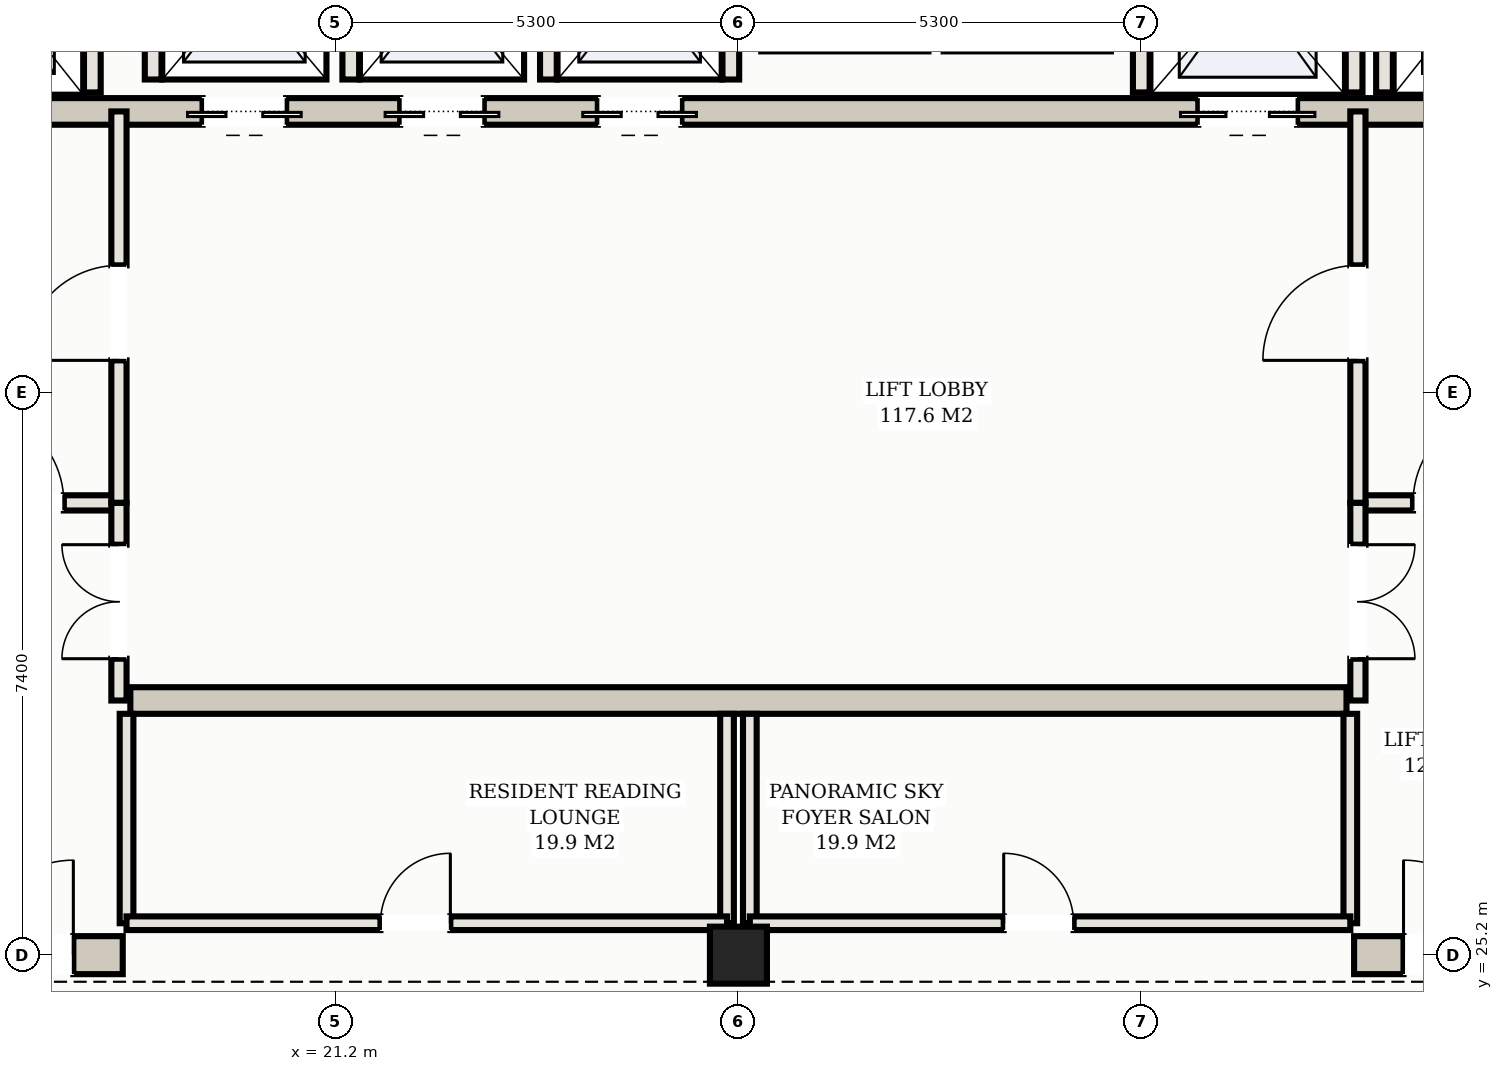
"""IFC4 building model, lengths in metres.
Left out: names, types, materials, properties, quantities, classifications, styles, units other than length and angle.
Written with IfcOpenShell. Run it as: python <this file> out.ifc"""

import sys

from ifc_helpers import new_model, si_unit, direction, frame, frame_2d, origin, origin_2d, place, context, subcontext, project, spatial, rectangle, hollow_rectangle, extrude, element, fill, save


model = new_model("IFC4")
c1 = context("Model", 3, precision=1e-05, world=origin(), true_north=direction((0.0, 1.0)))
c2 = subcontext(c1, "Body", "Model", "MODEL_VIEW")
j1 = project(units=[si_unit("LENGTHUNIT", "METRE"), si_unit("PLANEANGLEUNIT", "RADIAN")], contexts=[c1])
p1 = place(None, origin())
s1 = spatial("IfcSite", under=j1, at=p1, CompositionType="ELEMENT")
p2 = place(p1, origin())
s2 = spatial("IfcBuilding", under=s1, at=p2, CompositionType="ELEMENT")
p3 = place(p2, frame((0.0, 0.0, 226.4)))
s3 = spatial("IfcBuildingStorey", under=s2, at=p3, CompositionType="ELEMENT", Elevation=226.4)
p4 = place(p3, frame((10.35, 25.2, 0.0), z_axis=(0.0, 0.0, 1.0), x_axis=(1.0, 0.0, 0.0)))
e1 = element("IfcWall", 1, at=p4, inside=s3, PredefinedType="SHEAR", context=c2, shape_type="SweptSolid", body=[
    extrude(rectangle(XDim=8.05, YDim=0.5, at=frame_2d((4.025, 0.0))), origin(), (0.0, 0.0, 1.0), 3.11),
])
p5 = place(p4, frame((6.15, 0.0, 0.0)))
e2 = element("IfcOpeningElement", 2, at=p5, cuts=e1, PredefinedType="OPENING", context=c2, shape_type="SweptSolid", body=[
    extrude(rectangle(XDim=1.25, YDim=2.2, at=frame_2d((0.625, 1.1))), frame((0.0, 0.26, 0.0), z_axis=(0.0, -1.0, 0.0), x_axis=(1.0, 0.0, 0.0)), (0.0, 0.0, 1.0), 0.52),
])
p6 = place(p3, frame((34.6, 25.2, 0.0), z_axis=(0.0, 0.0, 1.0), x_axis=(1.0, 0.0, 0.0)))
e3 = element("IfcWall", 3, at=p6, inside=s3, PredefinedType="SHEAR", context=c2, shape_type="SweptSolid", body=[
    extrude(rectangle(XDim=8.05, YDim=0.5, at=frame_2d((4.025, 0.0))), origin(), (0.0, 0.0, 1.0), 3.11),
])
p7 = place(p6, frame((0.65, 0.0, 0.0)))
e4 = element("IfcOpeningElement", 4, at=p7, cuts=e3, PredefinedType="OPENING", context=c2, shape_type="SweptSolid", body=[
    extrude(rectangle(XDim=1.25, YDim=2.2, at=frame_2d((0.625, 1.1))), frame((0.0, 0.26, 0.0), z_axis=(0.0, -1.0, 0.0), x_axis=(1.0, 0.0, 0.0)), (0.0, 0.0, 1.0), 0.52),
])
p8 = place(p3, frame((15.5, 36.3, 0.0), z_axis=(0.0, 0.0, 1.0), x_axis=(1.0, 0.0, 0.0)))
e5 = element("IfcWall", 5, at=p8, inside=s3, PredefinedType="SHEAR", context=c2, shape_type="SweptSolid", body=[
    extrude(rectangle(XDim=22.0, YDim=0.35, at=frame_2d((11.0, 0.0))), origin(), (0.0, 0.0, 1.0), 3.11),
])
p9 = place(p8, frame((0.65, 0.0, 0.0)))
e6 = element("IfcOpeningElement", 6, at=p9, cuts=e5, PredefinedType="OPENING", context=c2, shape_type="SweptSolid", body=[
    extrude(rectangle(XDim=1.1, YDim=2.15, at=frame_2d((0.55, 1.075))), frame((0.0, 0.185, 0.0), z_axis=(0.0, -1.0, 0.0), x_axis=(1.0, 0.0, 0.0)), (0.0, 0.0, 1.0), 0.37),
])
p10 = place(p8, frame((20.25, 0.0, 0.0)))
e7 = element("IfcOpeningElement", 7, at=p10, cuts=e5, PredefinedType="OPENING", context=c2, shape_type="SweptSolid", body=[
    extrude(rectangle(XDim=1.1, YDim=2.15, at=frame_2d((0.55, 1.075))), frame((0.0, 0.185, 0.0), z_axis=(0.0, -1.0, 0.0), x_axis=(1.0, 0.0, 0.0)), (0.0, 0.0, 1.0), 0.37),
])
p11 = place(p8, frame((17.05, 0.0, 0.0)))
e8 = element("IfcOpeningElement", 8, at=p11, cuts=e5, PredefinedType="OPENING", context=c2, shape_type="SweptSolid", body=[
    extrude(rectangle(XDim=1.3, YDim=2.2, at=frame_2d((0.65, 1.1))), frame((0.0, 0.185, 0.0), z_axis=(0.0, -1.0, 0.0), x_axis=(1.0, 0.0, 0.0)), (0.0, 0.0, 1.0), 0.37),
])
p12 = place(p8, frame((3.95, 0.0, 0.0)))
e9 = element("IfcOpeningElement", 9, at=p12, cuts=e5, PredefinedType="OPENING", context=c2, shape_type="SweptSolid", body=[
    extrude(rectangle(XDim=1.1, YDim=2.15, at=frame_2d((0.55, 1.075))), frame((0.0, 0.185, 0.0), z_axis=(0.0, -1.0, 0.0), x_axis=(1.0, 0.0, 0.0)), (0.0, 0.0, 1.0), 0.37),
])
p13 = place(p8, frame((6.55, 0.0, 0.0)))
e10 = element("IfcOpeningElement", 10, at=p13, cuts=e5, PredefinedType="OPENING", context=c2, shape_type="SweptSolid", body=[
    extrude(rectangle(XDim=1.1, YDim=2.15, at=frame_2d((0.55, 1.075))), frame((0.0, 0.185, 0.0), z_axis=(0.0, -1.0, 0.0), x_axis=(1.0, 0.0, 0.0)), (0.0, 0.0, 1.0), 0.37),
])
p14 = place(p8, frame((9.15, 0.0, 0.0)))
e11 = element("IfcOpeningElement", 11, at=p14, cuts=e5, PredefinedType="OPENING", context=c2, shape_type="SweptSolid", body=[
    extrude(rectangle(XDim=1.1, YDim=2.15, at=frame_2d((0.55, 1.075))), frame((0.0, 0.185, 0.0), z_axis=(0.0, -1.0, 0.0), x_axis=(1.0, 0.0, 0.0)), (0.0, 0.0, 1.0), 0.37),
])
p15 = place(p3, frame((18.5, 28.55, 0.0), z_axis=(0.0, 0.0, 1.0), x_axis=(1.0, 0.0, 0.0)))
e12 = element("IfcWall", 12, at=p15, inside=s3, PredefinedType="SHEAR", context=c2, shape_type="SweptSolid", body=[
    extrude(rectangle(XDim=16.0, YDim=0.35, at=frame_2d((8.0, 0.0))), origin(), (0.0, 0.0, 1.0), 3.11),
])
p16 = place(p3, frame((26.5, 25.2, 0.0), z_axis=(0.0, 0.0, 1.0), x_axis=(1.0, 0.0, 0.0)))
e13 = element("IfcColumn", 13, at=p16, inside=s3, PredefinedType="COLUMN", context=c2, shape_type="SweptSolid", body=[
    extrude(hollow_rectangle(XDim=0.75, YDim=0.75, WallThickness=0.025, at=origin_2d()), origin(), (0.0, 0.0, 1.0), 3.3),
])
for number, where, z_axis, x_axis in (
    (14, (18.0, 36.55, 0.0), (0.0, 0.0, 1.0), (0.0, 1.0, 0.0)),
    (15, (35.0, 36.55, 0.0), (0.0, 0.0, 1.0), (0.0, 1.0, 0.0)),
    (16, (31.8, 36.55, 0.0), (0.0, 0.0, 1.0), (0.0, 1.0, 0.0)),
    (17, (34.6, 36.55, 0.0), (0.0, 0.0, 1.0), (0.0, 1.0, 0.0)),
):
    element("IfcWall", number, at=place(p3, frame(where, z_axis=z_axis, x_axis=x_axis)), inside=s3, PredefinedType="SOLIDWALL", context=c2, shape_type="SweptSolid", body=[
        extrude(rectangle(XDim=2.93, YDim=0.22, at=frame_2d((1.465, 0.0))), origin(), (0.0, 0.0, 1.0), 3.11),
    ])
for number, where, z_axis, x_axis in (
    (18, (18.8, 36.72, 0.0), (0.0, 0.0, 1.0), (0.0, 1.0, 0.0)),
    (19, (21.4, 36.72, 0.0), (0.0, 0.0, 1.0), (0.0, 1.0, 0.0)),
    (20, (24.0, 36.72, 0.0), (0.0, 0.0, 1.0), (0.0, 1.0, 0.0)),
    (21, (26.4, 36.72, 0.0), (0.0, 0.0, 1.0), (0.0, 1.0, 0.0)),
):
    element("IfcWall", number, at=place(p3, frame(where, z_axis=z_axis, x_axis=x_axis)), inside=s3, PredefinedType="SOLIDWALL", context=c2, shape_type="SweptSolid", body=[
        extrude(rectangle(XDim=2.56, YDim=0.22, at=frame_2d((1.28, 0.0))), origin(), (0.0, 0.0, 1.0), 3.11),
    ])
p17 = place(p3, frame((15.1, 31.15, 0.0), z_axis=(0.0, 0.0, 1.0), x_axis=(1.0, 0.0, 0.0)))
e22 = element("IfcWall", 22, at=p17, inside=s3, PredefinedType="PARTITIONING", context=c2, shape_type="SweptSolid", body=[
    extrude(rectangle(XDim=3.25, YDim=0.2, at=frame_2d((1.625, 0.0))), origin(), (0.0, 0.0, 1.0), 2.43),
])
p18 = place(p17, frame((1.275, 0.0, 0.0)))
e23 = element("IfcOpeningElement", 23, at=p18, cuts=e22, PredefinedType="OPENING", context=c2, shape_type="SweptSolid", body=[
    extrude(rectangle(XDim=1.25, YDim=2.2, at=frame_2d((0.625, 1.1))), frame((0.0, 0.11, 0.0), z_axis=(0.0, -1.0, 0.0), x_axis=(1.0, 0.0, 0.0)), (0.0, 0.0, 1.0), 0.22),
])
p19 = place(p3, frame((18.35, 31.15, 0.0), z_axis=(0.0, 0.0, 1.0), x_axis=(0.0, 1.0, 0.0)))
e24 = element("IfcWall", 24, at=p19, inside=s3, PredefinedType="PARTITIONING", context=c2, shape_type="SweptSolid", body=[
    extrude(rectangle(XDim=5.15, YDim=0.2, at=frame_2d((2.575, 0.0))), origin(), (0.0, 0.0, 1.0), 2.43),
])
p20 = place(p19, frame((1.875, 0.0, 0.0)))
e25 = element("IfcOpeningElement", 25, at=p20, cuts=e24, PredefinedType="OPENING", context=c2, shape_type="SweptSolid", body=[
    extrude(rectangle(XDim=1.25, YDim=2.2, at=frame_2d((0.625, 1.1))), frame((0.0, 0.11, 0.0), z_axis=(0.0, -1.0, 0.0), x_axis=(1.0, 0.0, 0.0)), (0.0, 0.0, 1.0), 0.22),
])
p21 = place(p3, frame((34.65, 31.15, 0.0), z_axis=(0.0, 0.0, 1.0), x_axis=(1.0, 0.0, 0.0)))
e26 = element("IfcWall", 26, at=p21, inside=s3, PredefinedType="PARTITIONING", context=c2, shape_type="SweptSolid", body=[
    extrude(rectangle(XDim=3.25, YDim=0.2, at=frame_2d((1.625, 0.0))), origin(), (0.0, 0.0, 1.0), 2.43),
])
p22 = place(p21, frame((0.725, 0.0, 0.0)))
e27 = element("IfcOpeningElement", 27, at=p22, cuts=e26, PredefinedType="OPENING", context=c2, shape_type="SweptSolid", body=[
    extrude(rectangle(XDim=1.25, YDim=2.2, at=frame_2d((0.625, 1.1))), frame((0.0, 0.11, 0.0), z_axis=(0.0, -1.0, 0.0), x_axis=(1.0, 0.0, 0.0)), (0.0, 0.0, 1.0), 0.22),
])
p23 = place(p3, frame((34.65, 31.15, 0.0), z_axis=(0.0, 0.0, 1.0), x_axis=(0.0, 1.0, 0.0)))
e28 = element("IfcWall", 28, at=p23, inside=s3, PredefinedType="PARTITIONING", context=c2, shape_type="SweptSolid", body=[
    extrude(rectangle(XDim=5.15, YDim=0.2, at=frame_2d((2.575, 0.0))), origin(), (0.0, 0.0, 1.0), 2.43),
])
p24 = place(p23, frame((1.875, 0.0, 0.0)))
e29 = element("IfcOpeningElement", 29, at=p24, cuts=e28, PredefinedType="OPENING", context=c2, shape_type="SweptSolid", body=[
    extrude(rectangle(XDim=1.25, YDim=2.2, at=frame_2d((0.625, 1.1))), frame((0.0, 0.11, 0.0), z_axis=(0.0, -1.0, 0.0), x_axis=(1.0, 0.0, 0.0)), (0.0, 0.0, 1.0), 0.22),
])
p25 = place(p3, frame((18.35, 28.55, 0.0), z_axis=(0.0, 0.0, 1.0), x_axis=(0.0, 1.0, 0.0)))
e30 = element("IfcWall", 30, at=p25, inside=s3, PredefinedType="PARTITIONING", context=c2, shape_type="SweptSolid", body=[
    extrude(rectangle(XDim=2.6, YDim=0.2, at=frame_2d((1.3, 0.0))), origin(), (0.0, 0.0, 1.0), 2.43),
])
p26 = place(p25, frame((0.55, 0.0, 0.0)))
e31 = element("IfcOpeningElement", 31, at=p26, cuts=e30, PredefinedType="OPENING", context=c2, shape_type="SweptSolid", body=[
    extrude(rectangle(XDim=1.5, YDim=2.25, at=frame_2d((0.75, 1.125))), frame((0.0, 0.11, 0.0), z_axis=(0.0, -1.0, 0.0), x_axis=(1.0, 0.0, 0.0)), (0.0, 0.0, 1.0), 0.22),
])
p27 = place(p3, frame((34.65, 28.55, 0.0), z_axis=(0.0, 0.0, 1.0), x_axis=(0.0, 1.0, 0.0)))
e32 = element("IfcWall", 32, at=p27, inside=s3, PredefinedType="PARTITIONING", context=c2, shape_type="SweptSolid", body=[
    extrude(rectangle(XDim=2.6, YDim=0.2, at=frame_2d((1.3, 0.0))), origin(), (0.0, 0.0, 1.0), 2.43),
])
p28 = place(p27, frame((0.55, 0.0, 0.0)))
e33 = element("IfcOpeningElement", 33, at=p28, cuts=e32, PredefinedType="OPENING", context=c2, shape_type="SweptSolid", body=[
    extrude(rectangle(XDim=1.5, YDim=2.25, at=frame_2d((0.75, 1.125))), frame((0.0, 0.11, 0.0), z_axis=(0.0, -1.0, 0.0), x_axis=(1.0, 0.0, 0.0)), (0.0, 0.0, 1.0), 0.22),
])
for number, where, z_axis, x_axis in (
    (34, (18.45, 25.62, 0.0), (0.0, 0.0, 1.0), (0.0, 1.0, 0.0)),
    (35, (26.35, 25.62, 0.0), (0.0, 0.0, 1.0), (0.0, 1.0, 0.0)),
):
    element("IfcWall", number, at=place(p3, frame(where, z_axis=z_axis, x_axis=x_axis)), inside=s3, PredefinedType="PARTITIONING", context=c2, shape_type="SweptSolid", body=[
        extrude(rectangle(XDim=2.755, YDim=0.18, at=frame_2d((1.377, 0.0))), origin(), (0.0, 0.0, 1.0), 2.43),
    ])
p29 = place(p3, frame((18.45, 25.62, 0.0), z_axis=(0.0, 0.0, 1.0), x_axis=(1.0, 0.0, 0.0)))
e36 = element("IfcWall", 36, at=p29, inside=s3, PredefinedType="PARTITIONING", context=c2, shape_type="SweptSolid", body=[
    extrude(rectangle(XDim=7.9, YDim=0.18, at=frame_2d((3.95, 0.0))), origin(), (0.0, 0.0, 1.0), 2.43),
])
p30 = place(p29, frame((3.34, 0.0, 0.0)))
e37 = element("IfcOpeningElement", 37, at=p30, cuts=e36, PredefinedType="OPENING", context=c2, shape_type="SweptSolid", body=[
    extrude(rectangle(XDim=0.92, YDim=2.15, at=frame_2d((0.46, 1.075))), frame((0.0, 0.1, 0.0), z_axis=(0.0, -1.0, 0.0), x_axis=(1.0, 0.0, 0.0)), (0.0, 0.0, 1.0), 0.2),
])
for number, where, z_axis, x_axis in (
    (38, (26.65, 25.62, 0.0), (0.0, 0.0, 1.0), (0.0, 1.0, 0.0)),
    (39, (34.55, 25.62, 0.0), (0.0, 0.0, 1.0), (0.0, 1.0, 0.0)),
):
    element("IfcWall", number, at=place(p3, frame(where, z_axis=z_axis, x_axis=x_axis)), inside=s3, PredefinedType="PARTITIONING", context=c2, shape_type="SweptSolid", body=[
        extrude(rectangle(XDim=2.755, YDim=0.18, at=frame_2d((1.377, 0.0))), origin(), (0.0, 0.0, 1.0), 2.43),
    ])
p31 = place(p3, frame((26.65, 25.62, 0.0), z_axis=(0.0, 0.0, 1.0), x_axis=(1.0, 0.0, 0.0)))
e40 = element("IfcWall", 40, at=p31, inside=s3, PredefinedType="PARTITIONING", context=c2, shape_type="SweptSolid", body=[
    extrude(rectangle(XDim=7.9, YDim=0.18, at=frame_2d((3.95, 0.0))), origin(), (0.0, 0.0, 1.0), 2.43),
])
p32 = place(p31, frame((3.34, 0.0, 0.0)))
e41 = element("IfcOpeningElement", 41, at=p32, cuts=e40, PredefinedType="OPENING", context=c2, shape_type="SweptSolid", body=[
    extrude(rectangle(XDim=0.92, YDim=2.15, at=frame_2d((0.46, 1.075))), frame((0.0, 0.1, 0.0), z_axis=(0.0, -1.0, 0.0), x_axis=(1.0, 0.0, 0.0)), (0.0, 0.0, 1.0), 0.2),
])
p33 = place(p11, frame((1.3, 0.0, 0.0), z_axis=(0.0, 0.0, 1.0), x_axis=(-1.0, 0.0, 0.0)))
e42 = element("IfcDoor", 42, at=p33, inside=s3, OperationType="DOUBLE_DOOR_SLIDING", PredefinedType="DOOR", context=c2, shape_type="SweptSolid", body=[
    extrude(rectangle(XDim=1.3, YDim=2.2, at=frame_2d((0.65, 1.1))), frame((0.0, 0.025, 0.0), z_axis=(0.0, -1.0, 0.0), x_axis=(1.0, 0.0, 0.0)), (0.0, 0.0, 1.0), 0.05),
])
fill(e8, e42)
p34 = place(p12, frame((1.1, 0.0, 0.0), z_axis=(0.0, 0.0, 1.0), x_axis=(-1.0, 0.0, 0.0)))
e43 = element("IfcDoor", 43, at=p34, inside=s3, OperationType="DOUBLE_DOOR_SLIDING", PredefinedType="DOOR", context=c2, shape_type="SweptSolid", body=[
    extrude(rectangle(XDim=1.1, YDim=2.15, at=frame_2d((0.55, 1.075))), frame((0.0, 0.025, 0.0), z_axis=(0.0, -1.0, 0.0), x_axis=(1.0, 0.0, 0.0)), (0.0, 0.0, 1.0), 0.05),
])
fill(e9, e43)
p35 = place(p13, frame((1.1, 0.0, 0.0), z_axis=(0.0, 0.0, 1.0), x_axis=(-1.0, 0.0, 0.0)))
e44 = element("IfcDoor", 44, at=p35, inside=s3, OperationType="DOUBLE_DOOR_SLIDING", PredefinedType="DOOR", context=c2, shape_type="SweptSolid", body=[
    extrude(rectangle(XDim=1.1, YDim=2.15, at=frame_2d((0.55, 1.075))), frame((0.0, 0.025, 0.0), z_axis=(0.0, -1.0, 0.0), x_axis=(1.0, 0.0, 0.0)), (0.0, 0.0, 1.0), 0.05),
])
fill(e10, e44)
p36 = place(p14, frame((1.1, 0.0, 0.0), z_axis=(0.0, 0.0, 1.0), x_axis=(-1.0, 0.0, 0.0)))
e45 = element("IfcDoor", 45, at=p36, inside=s3, OperationType="DOUBLE_DOOR_SLIDING", PredefinedType="DOOR", context=c2, shape_type="SweptSolid", body=[
    extrude(rectangle(XDim=1.1, YDim=2.15, at=frame_2d((0.55, 1.075))), frame((0.0, 0.025, 0.0), z_axis=(0.0, -1.0, 0.0), x_axis=(1.0, 0.0, 0.0)), (0.0, 0.0, 1.0), 0.05),
])
fill(e11, e45)
p37 = place(p5, origin())
e46 = element("IfcDoor", 46, at=p37, inside=s3, OperationType="SINGLE_SWING_RIGHT", PredefinedType="DOOR", context=c2, shape_type="SweptSolid", body=[
    extrude(rectangle(XDim=1.25, YDim=2.2, at=frame_2d((0.625, 1.1))), frame((0.0, 0.025, 0.0), z_axis=(0.0, -1.0, 0.0), x_axis=(1.0, 0.0, 0.0)), (0.0, 0.0, 1.0), 0.05),
])
fill(e2, e46)
p38 = place(p7, origin())
e47 = element("IfcDoor", 47, at=p38, inside=s3, OperationType="SINGLE_SWING_LEFT", PredefinedType="DOOR", context=c2, shape_type="SweptSolid", body=[
    extrude(rectangle(XDim=1.25, YDim=2.2, at=frame_2d((0.625, 1.1))), frame((0.0, 0.025, 0.0), z_axis=(0.0, -1.0, 0.0), x_axis=(1.0, 0.0, 0.0)), (0.0, 0.0, 1.0), 0.05),
])
fill(e4, e47)
p39 = place(p18, origin())
e48 = element("IfcDoor", 48, at=p39, inside=s3, OperationType="SINGLE_SWING_LEFT", PredefinedType="DOOR", context=c2, shape_type="SweptSolid", body=[
    extrude(rectangle(XDim=1.25, YDim=2.2, at=frame_2d((0.625, 1.1))), frame((0.0, 0.025, 0.0), z_axis=(0.0, -1.0, 0.0), x_axis=(1.0, 0.0, 0.0)), (0.0, 0.0, 1.0), 0.05),
])
fill(e23, e48)
p40 = place(p20, origin())
e49 = element("IfcDoor", 49, at=p40, inside=s3, OperationType="SINGLE_SWING_LEFT", PredefinedType="DOOR", context=c2, shape_type="SweptSolid", body=[
    extrude(rectangle(XDim=1.25, YDim=2.2, at=frame_2d((0.625, 1.1))), frame((0.0, 0.025, 0.0), z_axis=(0.0, -1.0, 0.0), x_axis=(1.0, 0.0, 0.0)), (0.0, 0.0, 1.0), 0.05),
])
fill(e25, e49)
p41 = place(p22, origin())
e50 = element("IfcDoor", 50, at=p41, inside=s3, OperationType="SINGLE_SWING_RIGHT", PredefinedType="DOOR", context=c2, shape_type="SweptSolid", body=[
    extrude(rectangle(XDim=1.25, YDim=2.2, at=frame_2d((0.625, 1.1))), frame((0.0, 0.025, 0.0), z_axis=(0.0, -1.0, 0.0), x_axis=(1.0, 0.0, 0.0)), (0.0, 0.0, 1.0), 0.05),
])
fill(e27, e50)
p42 = place(p24, origin())
e51 = element("IfcDoor", 51, at=p42, inside=s3, OperationType="SINGLE_SWING_LEFT", PredefinedType="DOOR", context=c2, shape_type="SweptSolid", body=[
    extrude(rectangle(XDim=1.25, YDim=2.2, at=frame_2d((0.625, 1.1))), frame((0.0, 0.025, 0.0), z_axis=(0.0, -1.0, 0.0), x_axis=(1.0, 0.0, 0.0)), (0.0, 0.0, 1.0), 0.05),
])
fill(e29, e51)
p43 = place(p26, origin())
e52 = element("IfcDoor", 52, at=p43, inside=s3, OperationType="DOUBLE_DOOR_SINGLE_SWING", PredefinedType="DOOR", context=c2, shape_type="SweptSolid", body=[
    extrude(rectangle(XDim=1.5, YDim=2.25, at=frame_2d((0.75, 1.125))), frame((0.0, 0.025, 0.0), z_axis=(0.0, -1.0, 0.0), x_axis=(1.0, 0.0, 0.0)), (0.0, 0.0, 1.0), 0.05),
])
fill(e31, e52)
p44 = place(p28, frame((1.5, 0.0, 0.0), z_axis=(0.0, 0.0, 1.0), x_axis=(-1.0, 0.0, 0.0)))
e53 = element("IfcDoor", 53, at=p44, inside=s3, OperationType="DOUBLE_DOOR_SINGLE_SWING", PredefinedType="DOOR", context=c2, shape_type="SweptSolid", body=[
    extrude(rectangle(XDim=1.5, YDim=2.25, at=frame_2d((0.75, 1.125))), frame((0.0, 0.025, 0.0), z_axis=(0.0, -1.0, 0.0), x_axis=(1.0, 0.0, 0.0)), (0.0, 0.0, 1.0), 0.05),
])
fill(e33, e53)
p45 = place(p30, origin())
e54 = element("IfcDoor", 54, at=p45, inside=s3, OperationType="SINGLE_SWING_RIGHT", PredefinedType="DOOR", context=c2, shape_type="SweptSolid", body=[
    extrude(rectangle(XDim=0.92, YDim=2.15, at=frame_2d((0.46, 1.075))), frame((0.0, 0.025, 0.0), z_axis=(0.0, -1.0, 0.0), x_axis=(1.0, 0.0, 0.0)), (0.0, 0.0, 1.0), 0.05),
])
fill(e37, e54)
p46 = place(p32, origin())
e55 = element("IfcDoor", 55, at=p46, inside=s3, OperationType="SINGLE_SWING_LEFT", PredefinedType="DOOR", context=c2, shape_type="SweptSolid", body=[
    extrude(rectangle(XDim=0.92, YDim=2.15, at=frame_2d((0.46, 1.075))), frame((0.0, 0.025, 0.0), z_axis=(0.0, -1.0, 0.0), x_axis=(1.0, 0.0, 0.0)), (0.0, 0.0, 1.0), 0.05),
])
fill(e41, e55)
save(model, sys.argv[1])
